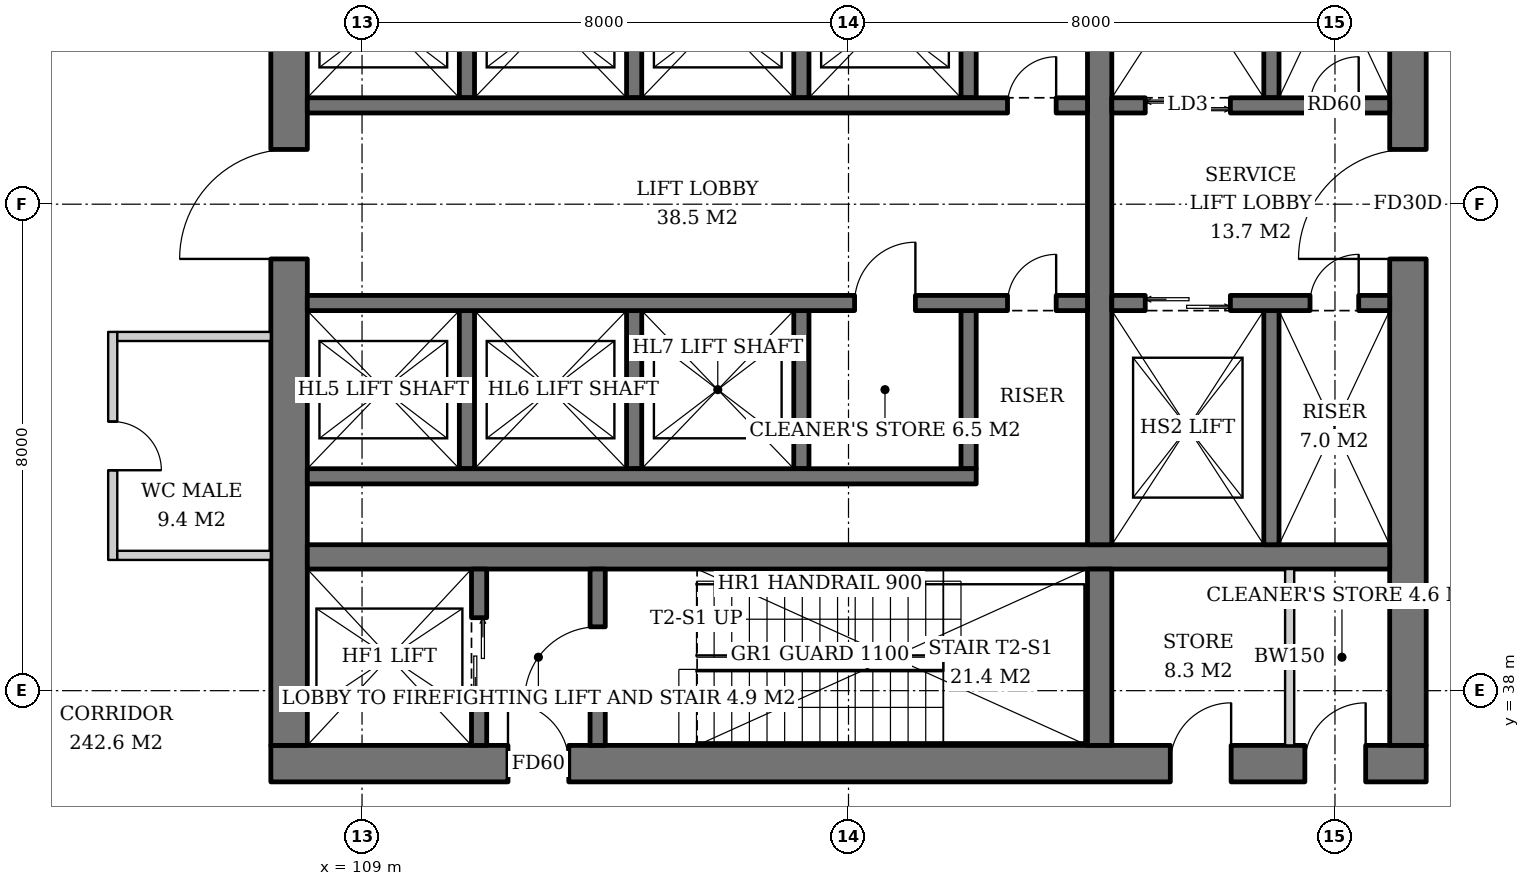
"""IFC4 building model, lengths in metres.
Left out: names, types, materials, properties, quantities, classifications, styles, units other than length and angle.
Written with IfcOpenShell. Run it as: python <this file> out.ifc"""

import sys

from ifc_helpers import new_model, si_unit, direction, frame, frame_2d, origin, place, context, subcontext, project, spatial, rectangle, extrude, element, fill, save


model = new_model("IFC4")
c1 = context("Model", 3, precision=1e-05, world=origin(), true_north=direction((0.0, 1.0)))
c2 = subcontext(c1, "Body", "Model", "MODEL_VIEW")
j1 = project(units=[si_unit("LENGTHUNIT", "METRE"), si_unit("PLANEANGLEUNIT", "RADIAN")], contexts=[c1])
p1 = place(None, origin())
s1 = spatial("IfcSite", under=j1, at=p1, CompositionType="ELEMENT")
p2 = place(p1, origin())
s2 = spatial("IfcBuilding", under=s1, at=p2, CompositionType="ELEMENT")
p3 = place(p2, frame((0.0, 0.0, 16.0)))
s3 = spatial("IfcBuildingStorey", under=s2, at=p3, CompositionType="ELEMENT", Elevation=16.0)
p4 = place(p3, frame((107.5, 36.8, 0.0), z_axis=(0.0, 0.0, 1.0), x_axis=(1.0, 0.0, 0.0)))
e1 = element("IfcWall", 1, at=p4, inside=s3, PredefinedType="SHEAR", context=c2, shape_type="SweptSolid", body=[
    extrude(rectangle(XDim=19.0, YDim=0.6, at=frame_2d((9.5, 0.0))), origin(), (0.0, 0.0, 1.0), 5.0),
])
p5 = place(p4, frame((3.9, 0.0, 0.0)))
e2 = element("IfcOpeningElement", 2, at=p5, cuts=e1, PredefinedType="OPENING", context=c2, shape_type="SweptSolid", body=[
    extrude(rectangle(XDim=1.0, YDim=2.1, at=frame_2d((0.5, 1.05))), frame((0.0, 0.31, 0.0), z_axis=(0.0, -1.0, 0.0), x_axis=(1.0, 0.0, 0.0)), (0.0, 0.0, 1.0), 0.62),
])
p6 = place(p4, frame((14.792, 0.0, 0.0)))
e3 = element("IfcOpeningElement", 3, at=p6, cuts=e1, PredefinedType="OPENING", context=c2, shape_type="SweptSolid", body=[
    extrude(rectangle(XDim=1.0, YDim=2.1, at=frame_2d((0.5, 1.05))), frame((0.0, 0.31, 0.0), z_axis=(0.0, -1.0, 0.0), x_axis=(1.0, 0.0, 0.0)), (0.0, 0.0, 1.0), 0.62),
])
p7 = place(p4, frame((17.005, 0.0, 0.0)))
e4 = element("IfcOpeningElement", 4, at=p7, cuts=e1, PredefinedType="OPENING", context=c2, shape_type="SweptSolid", body=[
    extrude(rectangle(XDim=1.0, YDim=2.1, at=frame_2d((0.5, 1.05))), frame((0.0, 0.31, 0.0), z_axis=(0.0, -1.0, 0.0), x_axis=(1.0, 0.0, 0.0)), (0.0, 0.0, 1.0), 0.62),
])
p8 = place(p3, frame((107.8, 37.1, 0.0), z_axis=(0.0, 0.0, 1.0), x_axis=(0.0, 1.0, 0.0)))
e5 = element("IfcWall", 5, at=p8, inside=s3, PredefinedType="SHEAR", context=c2, shape_type="SweptSolid", body=[
    extrude(rectangle(XDim=17.8, YDim=0.6, at=frame_2d((8.9, 0.0))), origin(), (0.0, 0.0, 1.0), 5.0),
])
p9 = place(p8, frame((8.0, 0.0, 0.0)))
e6 = element("IfcOpeningElement", 6, at=p9, cuts=e5, PredefinedType="OPENING", context=c2, shape_type="SweptSolid", body=[
    extrude(rectangle(XDim=1.8, YDim=2.4, at=frame_2d((0.9, 1.2))), frame((0.0, 0.31, 0.0), z_axis=(0.0, -1.0, 0.0), x_axis=(1.0, 0.0, 0.0)), (0.0, 0.0, 1.0), 0.62),
])
p10 = place(p3, frame((126.2, 37.1, 0.0), z_axis=(0.0, 0.0, 1.0), x_axis=(0.0, 1.0, 0.0)))
e7 = element("IfcWall", 7, at=p10, inside=s3, PredefinedType="SHEAR", context=c2, shape_type="SweptSolid", body=[
    extrude(rectangle(XDim=17.8, YDim=0.6, at=frame_2d((8.9, 0.0))), origin(), (0.0, 0.0, 1.0), 5.0),
])
p11 = place(p10, frame((8.0, 0.0, 0.0)))
e8 = element("IfcOpeningElement", 8, at=p11, cuts=e7, PredefinedType="OPENING", context=c2, shape_type="SweptSolid", body=[
    extrude(rectangle(XDim=1.8, YDim=2.4, at=frame_2d((0.9, 1.2))), frame((0.0, 0.31, 0.0), z_axis=(0.0, -1.0, 0.0), x_axis=(1.0, 0.0, 0.0)), (0.0, 0.0, 1.0), 0.62),
])
p12 = place(p3, frame((108.1, 40.2, 0.0), z_axis=(0.0, 0.0, 1.0), x_axis=(1.0, 0.0, 0.0)))
e9 = element("IfcWall", 9, at=p12, inside=s3, PredefinedType="SHEAR", context=c2, shape_type="SweptSolid", body=[
    extrude(rectangle(XDim=17.8, YDim=0.4, at=frame_2d((8.9, 0.0))), origin(), (0.0, 0.0, 1.0), 5.0),
])
p13 = place(p3, frame((121.13, 37.1, 0.0), z_axis=(0.0, 0.0, 1.0), x_axis=(0.0, 1.0, 0.0)))
e10 = element("IfcWall", 10, at=p13, inside=s3, PredefinedType="SHEAR", context=c2, shape_type="SweptSolid", body=[
    extrude(rectangle(XDim=2.9, YDim=0.4, at=frame_2d((1.45, 0.0))), origin(), (0.0, 0.0, 1.0), 5.0),
])
p14 = place(p3, frame((121.13, 40.4, 0.0), z_axis=(0.0, 0.0, 1.0), x_axis=(0.0, 1.0, 0.0)))
e11 = element("IfcWall", 11, at=p14, inside=s3, PredefinedType="SHEAR", context=c2, shape_type="SweptSolid", body=[
    extrude(rectangle(XDim=11.2, YDim=0.4, at=frame_2d((5.6, 0.0))), origin(), (0.0, 0.0, 1.0), 5.0),
])
p15 = place(p3, frame((110.925, 37.1, 0.0), z_axis=(0.0, 0.0, 1.0), x_axis=(0.0, 1.0, 0.0)))
e12 = element("IfcWall", 12, at=p15, inside=s3, PredefinedType="SHEAR", context=c2, shape_type="SweptSolid", body=[
    extrude(rectangle(XDim=2.9, YDim=0.25, at=frame_2d((1.45, 0.0))), origin(), (0.0, 0.0, 1.0), 5.0),
])
p16 = place(p15, frame((0.8, 0.0, 0.0)))
e13 = element("IfcOpeningElement", 13, at=p16, cuts=e12, PredefinedType="OPENING", context=c2, shape_type="SweptSolid", body=[
    extrude(rectangle(XDim=1.3, YDim=2.2, at=frame_2d((0.65, 1.1))), frame((0.0, 0.135, 0.0), z_axis=(0.0, -1.0, 0.0), x_axis=(1.0, 0.0, 0.0)), (0.0, 0.0, 1.0), 0.27),
])
p17 = place(p3, frame((112.875, 37.1, 0.0), z_axis=(0.0, 0.0, 1.0), x_axis=(0.0, 1.0, 0.0)))
e14 = element("IfcWall", 14, at=p17, inside=s3, PredefinedType="SHEAR", context=c2, shape_type="SweptSolid", body=[
    extrude(rectangle(XDim=2.9, YDim=0.25, at=frame_2d((1.45, 0.0))), origin(), (0.0, 0.0, 1.0), 5.0),
])
p18 = place(p17, frame((0.75, 0.0, 0.0)))
e15 = element("IfcOpeningElement", 15, at=p18, cuts=e14, PredefinedType="OPENING", context=c2, shape_type="SweptSolid", body=[
    extrude(rectangle(XDim=1.2, YDim=2.1, at=frame_2d((0.6, 1.05))), frame((0.0, 0.135, 0.0), z_axis=(0.0, -1.0, 0.0), x_axis=(1.0, 0.0, 0.0)), (0.0, 0.0, 1.0), 0.27),
])
for number, where, z_axis, x_axis in (
    (16, (110.725, 47.75, 0.0), (0.0, 0.0, 1.0), (0.0, 1.0, 0.0)),
    (17, (113.475, 47.75, 0.0), (0.0, 0.0, 1.0), (0.0, 1.0, 0.0)),
    (18, (116.225, 47.75, 0.0), (0.0, 0.0, 1.0), (0.0, 1.0, 0.0)),
    (19, (118.975, 47.75, 0.0), (0.0, 0.0, 1.0), (0.0, 1.0, 0.0)),
):
    element("IfcWall", number, at=place(p3, frame(where, z_axis=z_axis, x_axis=x_axis)), inside=s3, PredefinedType="SHEAR", context=c2, shape_type="SweptSolid", body=[
        extrude(rectangle(XDim=2.6, YDim=0.25, at=frame_2d((1.3, 0.0))), origin(), (0.0, 0.0, 1.0), 5.0),
    ])
p19 = place(p3, frame((108.1, 47.625, 0.0), z_axis=(0.0, 0.0, 1.0), x_axis=(1.0, 0.0, 0.0)))
e20 = element("IfcWall", 20, at=p19, inside=s3, PredefinedType="SHEAR", context=c2, shape_type="SweptSolid", body=[
    extrude(rectangle(XDim=12.83, YDim=0.25, at=frame_2d((6.415, 0.0))), origin(), (0.0, 0.0, 1.0), 5.0),
])
p20 = place(p19, frame((11.515, 0.0, 0.0)))
e21 = element("IfcOpeningElement", 21, at=p20, cuts=e20, PredefinedType="OPENING", context=c2, shape_type="SweptSolid", body=[
    extrude(rectangle(XDim=0.8, YDim=2.0, at=frame_2d((0.4, 1.0))), frame((0.0, 0.135, 0.0), z_axis=(0.0, -1.0, 0.0), x_axis=(1.0, 0.0, 0.0)), (0.0, 0.0, 1.0), 0.27),
])
for number, where, z_axis, x_axis in (
    (22, (110.725, 44.25, 0.0), (0.0, 0.0, 1.0), (0.0, -1.0, 0.0)),
    (23, (113.475, 44.25, 0.0), (0.0, 0.0, 1.0), (0.0, -1.0, 0.0)),
    (24, (116.225, 44.25, 0.0), (0.0, 0.0, 1.0), (0.0, -1.0, 0.0)),
    (25, (118.975, 44.25, 0.0), (0.0, 0.0, 1.0), (0.0, -1.0, 0.0)),
):
    element("IfcWall", number, at=place(p3, frame(where, z_axis=z_axis, x_axis=x_axis)), inside=s3, PredefinedType="SHEAR", context=c2, shape_type="SweptSolid", body=[
        extrude(rectangle(XDim=2.6, YDim=0.25, at=frame_2d((1.3, 0.0))), origin(), (0.0, 0.0, 1.0), 5.0),
    ])
p21 = place(p3, frame((108.1, 41.525, 0.0), z_axis=(0.0, 0.0, 1.0), x_axis=(1.0, 0.0, 0.0)))
e26 = element("IfcWall", 26, at=p21, inside=s3, PredefinedType="SHEAR", context=c2, shape_type="SweptSolid", body=[
    extrude(rectangle(XDim=11.0, YDim=0.25, at=frame_2d((5.5, 0.0))), origin(), (0.0, 0.0, 1.0), 5.0),
])
p22 = place(p3, frame((108.1, 44.375, 0.0), z_axis=(0.0, 0.0, 1.0), x_axis=(1.0, 0.0, 0.0)))
e27 = element("IfcWall", 27, at=p22, inside=s3, PredefinedType="SHEAR", context=c2, shape_type="SweptSolid", body=[
    extrude(rectangle(XDim=12.83, YDim=0.25, at=frame_2d((6.415, 0.0))), origin(), (0.0, 0.0, 1.0), 5.0),
])
p23 = place(p22, frame((9.0, 0.0, 0.0)))
e28 = element("IfcOpeningElement", 28, at=p23, cuts=e27, PredefinedType="OPENING", context=c2, shape_type="SweptSolid", body=[
    extrude(rectangle(XDim=1.0, YDim=2.1, at=frame_2d((0.5, 1.05))), frame((0.0, 0.135, 0.0), z_axis=(0.0, -1.0, 0.0), x_axis=(1.0, 0.0, 0.0)), (0.0, 0.0, 1.0), 0.27),
])
p24 = place(p22, frame((11.515, 0.0, 0.0)))
e29 = element("IfcOpeningElement", 29, at=p24, cuts=e27, PredefinedType="OPENING", context=c2, shape_type="SweptSolid", body=[
    extrude(rectangle(XDim=0.8, YDim=2.0, at=frame_2d((0.4, 1.0))), frame((0.0, 0.135, 0.0), z_axis=(0.0, -1.0, 0.0), x_axis=(1.0, 0.0, 0.0)), (0.0, 0.0, 1.0), 0.27),
])
p25 = place(p3, frame((123.955, 47.75, 0.0), z_axis=(0.0, 0.0, 1.0), x_axis=(0.0, 1.0, 0.0)))
e30 = element("IfcWall", 30, at=p25, inside=s3, PredefinedType="SHEAR", context=c2, shape_type="SweptSolid", body=[
    extrude(rectangle(XDim=3.85, YDim=0.25, at=frame_2d((1.925, 0.0))), origin(), (0.0, 0.0, 1.0), 5.0),
])
p26 = place(p3, frame((121.33, 47.625, 0.0), z_axis=(0.0, 0.0, 1.0), x_axis=(1.0, 0.0, 0.0)))
e31 = element("IfcWall", 31, at=p26, inside=s3, PredefinedType="SHEAR", context=c2, shape_type="SweptSolid", body=[
    extrude(rectangle(XDim=4.57, YDim=0.25, at=frame_2d((2.285, 0.0))), origin(), (0.0, 0.0, 1.0), 5.0),
])
p27 = place(p26, frame((0.55, 0.0, 0.0)))
e32 = element("IfcOpeningElement", 32, at=p27, cuts=e31, PredefinedType="OPENING", context=c2, shape_type="SweptSolid", body=[
    extrude(rectangle(XDim=1.4, YDim=2.4, at=frame_2d((0.7, 1.2))), frame((0.0, 0.135, 0.0), z_axis=(0.0, -1.0, 0.0), x_axis=(1.0, 0.0, 0.0)), (0.0, 0.0, 1.0), 0.27),
])
p28 = place(p26, frame((3.26, 0.0, 0.0)))
e33 = element("IfcOpeningElement", 33, at=p28, cuts=e31, PredefinedType="OPENING", context=c2, shape_type="SweptSolid", body=[
    extrude(rectangle(XDim=0.8, YDim=2.0, at=frame_2d((0.4, 1.0))), frame((0.0, 0.135, 0.0), z_axis=(0.0, -1.0, 0.0), x_axis=(1.0, 0.0, 0.0)), (0.0, 0.0, 1.0), 0.27),
])
p29 = place(p3, frame((123.955, 44.25, 0.0), z_axis=(0.0, 0.0, 1.0), x_axis=(0.0, -1.0, 0.0)))
e34 = element("IfcWall", 34, at=p29, inside=s3, PredefinedType="SHEAR", context=c2, shape_type="SweptSolid", body=[
    extrude(rectangle(XDim=3.85, YDim=0.25, at=frame_2d((1.925, 0.0))), origin(), (0.0, 0.0, 1.0), 5.0),
])
p30 = place(p3, frame((121.33, 44.375, 0.0), z_axis=(0.0, 0.0, 1.0), x_axis=(1.0, 0.0, 0.0)))
e35 = element("IfcWall", 35, at=p30, inside=s3, PredefinedType="SHEAR", context=c2, shape_type="SweptSolid", body=[
    extrude(rectangle(XDim=4.57, YDim=0.25, at=frame_2d((2.285, 0.0))), origin(), (0.0, 0.0, 1.0), 5.0),
])
p31 = place(p30, frame((0.55, 0.0, 0.0)))
e36 = element("IfcOpeningElement", 36, at=p31, cuts=e35, PredefinedType="OPENING", context=c2, shape_type="SweptSolid", body=[
    extrude(rectangle(XDim=1.4, YDim=2.4, at=frame_2d((0.7, 1.2))), frame((0.0, 0.135, 0.0), z_axis=(0.0, -1.0, 0.0), x_axis=(1.0, 0.0, 0.0)), (0.0, 0.0, 1.0), 0.27),
])
p32 = place(p30, frame((3.26, 0.0, 0.0)))
e37 = element("IfcOpeningElement", 37, at=p32, cuts=e35, PredefinedType="OPENING", context=c2, shape_type="SweptSolid", body=[
    extrude(rectangle(XDim=0.8, YDim=2.0, at=frame_2d((0.4, 1.0))), frame((0.0, 0.135, 0.0), z_axis=(0.0, -1.0, 0.0), x_axis=(1.0, 0.0, 0.0)), (0.0, 0.0, 1.0), 0.27),
])
p33 = place(p3, frame((124.255, 37.1, 0.0), z_axis=(0.0, 0.0, 1.0), x_axis=(0.0, 1.0, 0.0)))
e38 = element("IfcWall", 38, at=p33, inside=s3, PredefinedType="SOLIDWALL", context=c2, shape_type="SweptSolid", body=[
    extrude(rectangle(XDim=2.9, YDim=0.15, at=frame_2d((1.45, 0.0))), origin(), (0.0, 0.0, 1.0), 4.7),
])
p34 = place(p3, frame((104.9, 43.9, 0.0), z_axis=(0.0, 0.0, 1.0), x_axis=(0.0, -1.0, 0.0)))
e39 = element("IfcWall", 39, at=p34, inside=s3, PredefinedType="PARTITIONING", context=c2, shape_type="SweptSolid", body=[
    extrude(rectangle(XDim=3.75, YDim=0.15, at=frame_2d((1.875, 0.0))), origin(), (0.0, 0.0, 1.0), 3.947),
])
p35 = place(p34, frame((1.475, 0.0, 0.0)))
e40 = element("IfcOpeningElement", 40, at=p35, cuts=e39, PredefinedType="OPENING", context=c2, shape_type="SweptSolid", body=[
    extrude(rectangle(XDim=0.8, YDim=2.1, at=frame_2d((0.4, 1.05))), frame((0.0, 0.085, 0.0), z_axis=(0.0, -1.0, 0.0), x_axis=(1.0, 0.0, 0.0)), (0.0, 0.0, 1.0), 0.17),
])
for number, where, z_axis, x_axis in (
    (41, (104.975, 43.825, 0.0), (0.0, 0.0, 1.0), (1.0, 0.0, 0.0)),
    (42, (104.975, 40.225, 0.0), (0.0, 0.0, 1.0), (1.0, 0.0, 0.0)),
):
    element("IfcWall", number, at=place(p3, frame(where, z_axis=z_axis, x_axis=x_axis)), inside=s3, PredefinedType="PARTITIONING", context=c2, shape_type="SweptSolid", body=[
        extrude(rectangle(XDim=2.525, YDim=0.15, at=frame_2d((1.262, 0.0))), origin(), (0.0, 0.0, 1.0), 4.7),
    ])
p36 = place(p16, origin())
e43 = element("IfcDoor", 43, at=p36, inside=s3, OperationType="DOUBLE_DOOR_SLIDING", PredefinedType="DOOR", context=c2, shape_type="SweptSolid", body=[
    extrude(rectangle(XDim=1.3, YDim=2.2, at=frame_2d((0.65, 1.1))), frame((0.0, 0.025, 0.0), z_axis=(0.0, -1.0, 0.0), x_axis=(1.0, 0.0, 0.0)), (0.0, 0.0, 1.0), 0.05),
])
fill(e13, e43)
p37 = place(p18, origin())
e44 = element("IfcDoor", 44, at=p37, inside=s3, OperationType="SINGLE_SWING_LEFT", PredefinedType="DOOR", context=c2, shape_type="SweptSolid", body=[
    extrude(rectangle(XDim=1.2, YDim=2.1, at=frame_2d((0.6, 1.05))), frame((0.0, 0.025, 0.0), z_axis=(0.0, -1.0, 0.0), x_axis=(1.0, 0.0, 0.0)), (0.0, 0.0, 1.0), 0.05),
])
fill(e15, e44)
p38 = place(p20, origin())
e45 = element("IfcDoor", 45, at=p38, inside=s3, OperationType="SINGLE_SWING_RIGHT", PredefinedType="DOOR", context=c2, shape_type="SweptSolid", body=[
    extrude(rectangle(XDim=0.8, YDim=2.0, at=frame_2d((0.4, 1.0))), frame((0.0, 0.025, 0.0), z_axis=(0.0, -1.0, 0.0), x_axis=(1.0, 0.0, 0.0)), (0.0, 0.0, 1.0), 0.05),
])
fill(e21, e45)
p39 = place(p23, origin())
e46 = element("IfcDoor", 46, at=p39, inside=s3, OperationType="SINGLE_SWING_RIGHT", PredefinedType="DOOR", context=c2, shape_type="SweptSolid", body=[
    extrude(rectangle(XDim=1.0, YDim=2.1, at=frame_2d((0.5, 1.05))), frame((0.0, 0.025, 0.0), z_axis=(0.0, -1.0, 0.0), x_axis=(1.0, 0.0, 0.0)), (0.0, 0.0, 1.0), 0.05),
])
fill(e28, e46)
p40 = place(p24, origin())
e47 = element("IfcDoor", 47, at=p40, inside=s3, OperationType="SINGLE_SWING_RIGHT", PredefinedType="DOOR", context=c2, shape_type="SweptSolid", body=[
    extrude(rectangle(XDim=0.8, YDim=2.0, at=frame_2d((0.4, 1.0))), frame((0.0, 0.025, 0.0), z_axis=(0.0, -1.0, 0.0), x_axis=(1.0, 0.0, 0.0)), (0.0, 0.0, 1.0), 0.05),
])
fill(e29, e47)
p41 = place(p27, origin())
e48 = element("IfcDoor", 48, at=p41, inside=s3, OperationType="DOUBLE_DOOR_SLIDING", PredefinedType="DOOR", context=c2, shape_type="SweptSolid", body=[
    extrude(rectangle(XDim=1.4, YDim=2.4, at=frame_2d((0.7, 1.2))), frame((0.0, 0.025, 0.0), z_axis=(0.0, -1.0, 0.0), x_axis=(1.0, 0.0, 0.0)), (0.0, 0.0, 1.0), 0.05),
])
fill(e32, e48)
p42 = place(p28, origin())
e49 = element("IfcDoor", 49, at=p42, inside=s3, OperationType="SINGLE_SWING_RIGHT", PredefinedType="DOOR", context=c2, shape_type="SweptSolid", body=[
    extrude(rectangle(XDim=0.8, YDim=2.0, at=frame_2d((0.4, 1.0))), frame((0.0, 0.025, 0.0), z_axis=(0.0, -1.0, 0.0), x_axis=(1.0, 0.0, 0.0)), (0.0, 0.0, 1.0), 0.05),
])
fill(e33, e49)
p43 = place(p31, origin())
e50 = element("IfcDoor", 50, at=p43, inside=s3, OperationType="DOUBLE_DOOR_SLIDING", PredefinedType="DOOR", context=c2, shape_type="SweptSolid", body=[
    extrude(rectangle(XDim=1.4, YDim=2.4, at=frame_2d((0.7, 1.2))), frame((0.0, 0.025, 0.0), z_axis=(0.0, -1.0, 0.0), x_axis=(1.0, 0.0, 0.0)), (0.0, 0.0, 1.0), 0.05),
])
fill(e36, e50)
p44 = place(p32, origin())
e51 = element("IfcDoor", 51, at=p44, inside=s3, OperationType="SINGLE_SWING_RIGHT", PredefinedType="DOOR", context=c2, shape_type="SweptSolid", body=[
    extrude(rectangle(XDim=0.8, YDim=2.0, at=frame_2d((0.4, 1.0))), frame((0.0, 0.025, 0.0), z_axis=(0.0, -1.0, 0.0), x_axis=(1.0, 0.0, 0.0)), (0.0, 0.0, 1.0), 0.05),
])
fill(e37, e51)
p45 = place(p5, origin())
e52 = element("IfcDoor", 52, at=p45, inside=s3, OperationType="SINGLE_SWING_LEFT", PredefinedType="DOOR", context=c2, shape_type="SweptSolid", body=[
    extrude(rectangle(XDim=1.0, YDim=2.1, at=frame_2d((0.5, 1.05))), frame((0.0, 0.025, 0.0), z_axis=(0.0, -1.0, 0.0), x_axis=(1.0, 0.0, 0.0)), (0.0, 0.0, 1.0), 0.05),
])
fill(e2, e52)
p46 = place(p9, origin())
e53 = element("IfcDoor", 53, at=p46, inside=s3, OperationType="DOUBLE_DOOR_SINGLE_SWING", PredefinedType="DOOR", context=c2, shape_type="SweptSolid", body=[
    extrude(rectangle(XDim=1.8, YDim=2.4, at=frame_2d((0.9, 1.2))), frame((0.0, 0.025, 0.0), z_axis=(0.0, -1.0, 0.0), x_axis=(1.0, 0.0, 0.0)), (0.0, 0.0, 1.0), 0.05),
])
fill(e6, e53)
p47 = place(p11, origin())
e54 = element("IfcDoor", 54, at=p47, inside=s3, OperationType="DOUBLE_DOOR_SINGLE_SWING", PredefinedType="DOOR", context=c2, shape_type="SweptSolid", body=[
    extrude(rectangle(XDim=1.8, YDim=2.4, at=frame_2d((0.9, 1.2))), frame((0.0, 0.025, 0.0), z_axis=(0.0, -1.0, 0.0), x_axis=(1.0, 0.0, 0.0)), (0.0, 0.0, 1.0), 0.05),
])
fill(e8, e54)
p48 = place(p6, origin())
e55 = element("IfcDoor", 55, at=p48, inside=s3, OperationType="SINGLE_SWING_RIGHT", PredefinedType="DOOR", context=c2, shape_type="SweptSolid", body=[
    extrude(rectangle(XDim=1.0, YDim=2.1, at=frame_2d((0.5, 1.05))), frame((0.0, 0.29, 0.0), z_axis=(0.0, -1.0, 0.0), x_axis=(1.0, 0.0, 0.0)), (0.0, 0.0, 1.0), 0.05),
])
fill(e3, e55)
p49 = place(p7, origin())
e56 = element("IfcDoor", 56, at=p49, inside=s3, OperationType="SINGLE_SWING_RIGHT", PredefinedType="DOOR", context=c2, shape_type="SweptSolid", body=[
    extrude(rectangle(XDim=1.0, YDim=2.1, at=frame_2d((0.5, 1.05))), frame((0.0, 0.29, 0.0), z_axis=(0.0, -1.0, 0.0), x_axis=(1.0, 0.0, 0.0)), (0.0, 0.0, 1.0), 0.05),
])
fill(e4, e56)
p50 = place(p35, origin())
e57 = element("IfcDoor", 57, at=p50, inside=s3, OperationType="SINGLE_SWING_RIGHT", PredefinedType="DOOR", context=c2, shape_type="SweptSolid", body=[
    extrude(rectangle(XDim=0.8, YDim=2.1, at=frame_2d((0.4, 1.05))), frame((0.0, 0.025, 0.0), z_axis=(0.0, -1.0, 0.0), x_axis=(1.0, 0.0, 0.0)), (0.0, 0.0, 1.0), 0.05),
])
fill(e40, e57)
save(model, sys.argv[1])
